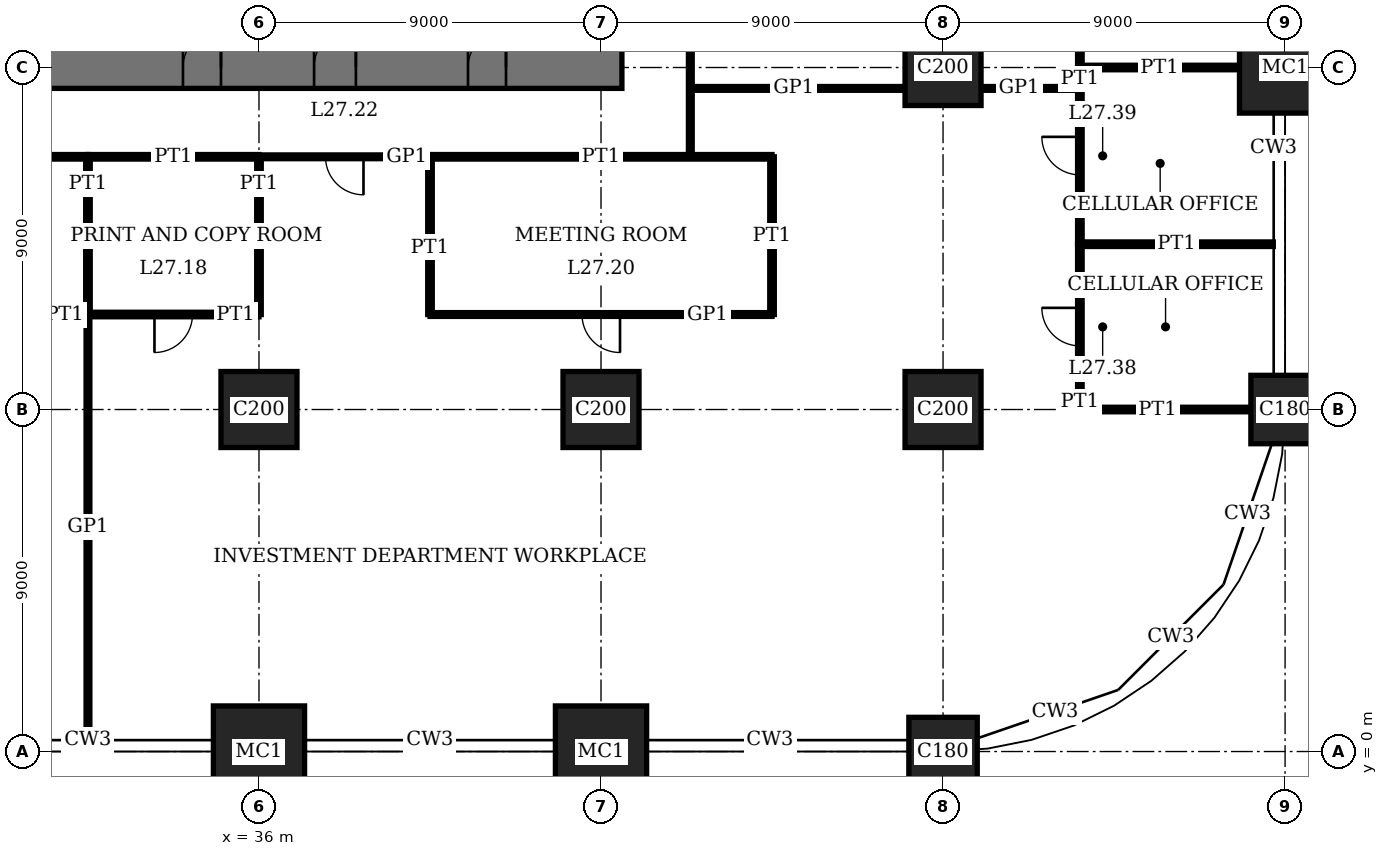
"""IFC4 building model, lengths in metres.
Left out: names, types, materials, properties, quantities, classifications, styles, units other than length and angle.
Written with IfcOpenShell. Run it as: python <this file> out.ifc"""

import sys

from ifc_helpers import new_model, si_unit, direction, frame, frame_2d, origin, origin_2d, place, context, subcontext, project, spatial, rectangle, extrude, element, fill, save


model = new_model("IFC4")
c1 = context("Model", 3, precision=1e-05, world=origin(), true_north=direction((0.0, 1.0)))
c2 = subcontext(c1, "Body", "Model", "MODEL_VIEW")
j1 = project(units=[si_unit("LENGTHUNIT", "METRE"), si_unit("PLANEANGLEUNIT", "RADIAN")], contexts=[c1])
p1 = place(None, origin())
s1 = spatial("IfcSite", under=j1, at=p1, CompositionType="ELEMENT")
p2 = place(p1, origin())
s2 = spatial("IfcBuilding", under=s1, at=p2, CompositionType="ELEMENT")
p3 = place(p2, frame((0.0, 0.0, 113.0)))
s3 = spatial("IfcBuildingStorey", under=s2, at=p3, CompositionType="ELEMENT", Elevation=113.0)
p4 = place(p3, frame((36.0, 0.0, 0.0), z_axis=(0.0, 0.0, 1.0), x_axis=(1.0, 0.0, 0.0)))
e1 = element("IfcColumn", 1, at=p4, inside=s3, PredefinedType="COLUMN", context=c2, shape_type="SweptSolid", body=[
    extrude(rectangle(XDim=2.4, YDim=2.4, at=origin_2d()), origin(), (0.0, 0.0, 1.0), 4.0),
])
p5 = place(p3, frame((36.0, 9.0, 0.0), z_axis=(0.0, 0.0, 1.0), x_axis=(1.0, 0.0, 0.0)))
e2 = element("IfcColumn", 2, at=p5, inside=s3, PredefinedType="COLUMN", context=c2, shape_type="SweptSolid", body=[
    extrude(rectangle(XDim=2.0, YDim=2.0, at=origin_2d()), origin(), (0.0, 0.0, 1.0), 4.0),
])
p6 = place(p3, frame((45.0, 0.0, 0.0), z_axis=(0.0, 0.0, 1.0), x_axis=(1.0, 0.0, 0.0)))
e3 = element("IfcColumn", 3, at=p6, inside=s3, PredefinedType="COLUMN", context=c2, shape_type="SweptSolid", body=[
    extrude(rectangle(XDim=2.4, YDim=2.4, at=origin_2d()), origin(), (0.0, 0.0, 1.0), 4.0),
])
p7 = place(p3, frame((45.0, 9.0, 0.0), z_axis=(0.0, 0.0, 1.0), x_axis=(1.0, 0.0, 0.0)))
e4 = element("IfcColumn", 4, at=p7, inside=s3, PredefinedType="COLUMN", context=c2, shape_type="SweptSolid", body=[
    extrude(rectangle(XDim=2.0, YDim=2.0, at=origin_2d()), origin(), (0.0, 0.0, 1.0), 4.0),
])
p8 = place(p3, frame((54.0, 0.0, 0.0), z_axis=(0.0, 0.0, 1.0), x_axis=(1.0, 0.0, 0.0)))
e5 = element("IfcColumn", 5, at=p8, inside=s3, PredefinedType="COLUMN", context=c2, shape_type="SweptSolid", body=[
    extrude(rectangle(XDim=1.8, YDim=1.8, at=origin_2d()), origin(), (0.0, 0.0, 1.0), 4.0),
])
for number, where, z_axis, x_axis in (
    (6, (54.0, 9.0, 0.0), (0.0, 0.0, 1.0), (1.0, 0.0, 0.0)),
    (7, (54.0, 18.0, 0.0), (0.0, 0.0, 1.0), (1.0, 0.0, 0.0)),
):
    element("IfcColumn", number, at=place(p3, frame(where, z_axis=z_axis, x_axis=x_axis)), inside=s3, PredefinedType="COLUMN", context=c2, shape_type="SweptSolid", body=[
        extrude(rectangle(XDim=2.0, YDim=2.0, at=origin_2d()), origin(), (0.0, 0.0, 1.0), 4.0),
    ])
p9 = place(p3, frame((63.0, 9.0, 0.0), z_axis=(0.0, 0.0, 1.0), x_axis=(1.0, 0.0, 0.0)))
e8 = element("IfcColumn", 8, at=p9, inside=s3, PredefinedType="COLUMN", context=c2, shape_type="SweptSolid", body=[
    extrude(rectangle(XDim=1.8, YDim=1.8, at=origin_2d()), origin(), (0.0, 0.0, 1.0), 4.0),
])
p10 = place(p3, frame((63.0, 18.0, 0.0), z_axis=(0.0, 0.0, 1.0), x_axis=(1.0, 0.0, 0.0)))
e9 = element("IfcColumn", 9, at=p10, inside=s3, PredefinedType="COLUMN", context=c2, shape_type="SweptSolid", body=[
    extrude(rectangle(XDim=2.4, YDim=2.4, at=origin_2d()), origin(), (0.0, 0.0, 1.0), 4.0),
])
p11 = place(p3, frame((17.45, 18.0, 0.0), z_axis=(0.0, 0.0, 1.0), x_axis=(1.0, 0.0, 0.0)))
e10 = element("IfcWall", 10, at=p11, inside=s3, PredefinedType="SHEAR", context=c2, shape_type="SweptSolid", body=[
    extrude(rectangle(XDim=28.1, YDim=1.1, at=frame_2d((14.05, 0.0))), origin(), (0.0, 0.0, 1.0), 4.0),
])
p12 = place(p11, frame((11.55, 0.0, 0.0)))
e11 = element("IfcOpeningElement", 11, at=p12, cuts=e10, PredefinedType="OPENING", context=c2, shape_type="SweptSolid", body=[
    extrude(rectangle(XDim=1.0, YDim=2.4, at=frame_2d((0.5, 1.2))), frame((0.0, 0.56, 0.0), z_axis=(0.0, -1.0, 0.0), x_axis=(1.0, 0.0, 0.0)), (0.0, 0.0, 1.0), 1.12),
])
p13 = place(p11, frame((16.55, 0.0, 0.0)))
e12 = element("IfcOpeningElement", 12, at=p13, cuts=e10, PredefinedType="OPENING", context=c2, shape_type="SweptSolid", body=[
    extrude(rectangle(XDim=1.0, YDim=2.4, at=frame_2d((0.5, 1.2))), frame((0.0, 0.56, 0.0), z_axis=(0.0, -1.0, 0.0), x_axis=(1.0, 0.0, 0.0)), (0.0, 0.0, 1.0), 1.12),
])
p14 = place(p11, frame((20.0, 0.0, 0.0)))
e13 = element("IfcOpeningElement", 13, at=p14, cuts=e10, PredefinedType="OPENING", context=c2, shape_type="SweptSolid", body=[
    extrude(rectangle(XDim=1.1, YDim=2.4, at=frame_2d((0.55, 1.2))), frame((0.0, 0.56, 0.0), z_axis=(0.0, -1.0, 0.0), x_axis=(1.0, 0.0, 0.0)), (0.0, 0.0, 1.0), 1.12),
])
p15 = place(p11, frame((24.05, 0.0, 0.0)))
e14 = element("IfcOpeningElement", 14, at=p15, cuts=e10, PredefinedType="OPENING", context=c2, shape_type="SweptSolid", body=[
    extrude(rectangle(XDim=1.0, YDim=2.4, at=frame_2d((0.5, 1.2))), frame((0.0, 0.56, 0.0), z_axis=(0.0, -1.0, 0.0), x_axis=(1.0, 0.0, 0.0)), (0.0, 0.0, 1.0), 1.12),
])
p16 = place(p3, frame((57.6, 9.0, 0.0), z_axis=(0.0, 0.0, 1.0), x_axis=(1.0, 0.0, 0.0)))
e15 = element("IfcWall", 15, at=p16, inside=s3, PredefinedType="PARTITIONING", context=c2, shape_type="SweptSolid", body=[
    extrude(rectangle(XDim=4.5, YDim=0.12, at=frame_2d((2.25, 0.0))), origin(), (0.0, 0.0, 1.0), 3.05),
])
p17 = place(p3, frame((27.0, 11.5, 0.0), z_axis=(0.0, 0.0, 1.0), x_axis=(1.0, 0.0, 0.0)))
e16 = element("IfcWall", 16, at=p17, inside=s3, PredefinedType="PARTITIONING", context=c2, shape_type="SweptSolid", body=[
    extrude(rectangle(XDim=4.5, YDim=0.12, at=frame_2d((2.25, 0.0))), origin(), (0.0, 0.0, 1.0), 3.75),
])
p18 = place(p17, frame((1.75, 0.0, 0.0)))
e17 = element("IfcOpeningElement", 17, at=p18, cuts=e16, PredefinedType="OPENING", context=c2, shape_type="SweptSolid", body=[
    extrude(rectangle(XDim=1.0, YDim=2.4, at=frame_2d((0.5, 1.2))), frame((0.0, 0.07, 0.0), z_axis=(0.0, -1.0, 0.0), x_axis=(1.0, 0.0, 0.0)), (0.0, 0.0, 1.0), 0.14),
])
p19 = place(p3, frame((31.5, 11.5, 0.0), z_axis=(0.0, 0.0, 1.0), x_axis=(1.0, 0.0, 0.0)))
e18 = element("IfcWall", 18, at=p19, inside=s3, PredefinedType="PARTITIONING", context=c2, shape_type="SweptSolid", body=[
    extrude(rectangle(XDim=4.5, YDim=0.12, at=frame_2d((2.25, 0.0))), origin(), (0.0, 0.0, 1.0), 3.75),
])
p20 = place(p19, frame((1.75, 0.0, 0.0)))
e19 = element("IfcOpeningElement", 19, at=p20, cuts=e18, PredefinedType="OPENING", context=c2, shape_type="SweptSolid", body=[
    extrude(rectangle(XDim=1.0, YDim=2.4, at=frame_2d((0.5, 1.2))), frame((0.0, 0.07, 0.0), z_axis=(0.0, -1.0, 0.0), x_axis=(1.0, 0.0, 0.0)), (0.0, 0.0, 1.0), 0.14),
])
p21 = place(p3, frame((40.5, 11.5, 0.0), z_axis=(0.0, 0.0, 1.0), x_axis=(1.0, 0.0, 0.0)))
e20 = element("IfcWall", 20, at=p21, inside=s3, PredefinedType="PARTITIONING", context=c2, shape_type="SweptSolid", body=[
    extrude(rectangle(XDim=9.0, YDim=0.1, at=frame_2d((4.5, 0.0))), origin(), (0.0, 0.0, 1.0), 3.75),
])
p22 = place(p21, frame((4.0, 0.0, 0.0)))
e21 = element("IfcOpeningElement", 21, at=p22, cuts=e20, PredefinedType="OPENING", context=c2, shape_type="SweptSolid", body=[
    extrude(rectangle(XDim=1.0, YDim=2.4, at=frame_2d((0.5, 1.2))), frame((0.0, 0.06, 0.0), z_axis=(0.0, -1.0, 0.0), x_axis=(1.0, 0.0, 0.0)), (0.0, 0.0, 1.0), 0.12),
])
p23 = place(p3, frame((57.6, 13.35, 0.0), z_axis=(0.0, 0.0, 1.0), x_axis=(1.0, 0.0, 0.0)))
e22 = element("IfcWall", 22, at=p23, inside=s3, PredefinedType="PARTITIONING", context=c2, shape_type="SweptSolid", body=[
    extrude(rectangle(XDim=5.09, YDim=0.12, at=frame_2d((2.545, 0.0))), origin(), (0.0, 0.0, 1.0), 3.1),
])
p24 = place(p3, frame((40.5, 15.65, 0.0), z_axis=(0.0, 0.0, 1.0), x_axis=(1.0, 0.0, 0.0)))
e23 = element("IfcWall", 23, at=p24, inside=s3, PredefinedType="PARTITIONING", context=c2, shape_type="SweptSolid", body=[
    extrude(rectangle(XDim=9.0, YDim=0.12, at=frame_2d((4.5, 0.0))), origin(), (0.0, 0.0, 1.0), 3.75),
])
for number, where, z_axis, x_axis in (
    (24, (27.0, 15.65, 0.0), (0.0, 0.0, 1.0), (1.0, 0.0, 0.0)),
    (25, (31.5, 15.65, 0.0), (0.0, 0.0, 1.0), (1.0, 0.0, 0.0)),
):
    element("IfcWall", number, at=place(p3, frame(where, z_axis=z_axis, x_axis=x_axis)), inside=s3, PredefinedType="PARTITIONING", context=c2, shape_type="SweptSolid", body=[
        extrude(rectangle(XDim=4.5, YDim=0.12, at=frame_2d((2.25, 0.0))), origin(), (0.0, 0.0, 1.0), 3.75),
    ])
p25 = place(p3, frame((36.0, 15.65, 0.0), z_axis=(0.0, 0.0, 1.0), x_axis=(1.0, 0.0, 0.0)))
e26 = element("IfcWall", 26, at=p25, inside=s3, PredefinedType="PARTITIONING", context=c2, shape_type="SweptSolid", body=[
    extrude(rectangle(XDim=4.5, YDim=0.1, at=frame_2d((2.25, 0.0))), origin(), (0.0, 0.0, 1.0), 3.75),
])
p26 = place(p25, frame((1.75, 0.0, 0.0)))
e27 = element("IfcOpeningElement", 27, at=p26, cuts=e26, PredefinedType="OPENING", context=c2, shape_type="SweptSolid", body=[
    extrude(rectangle(XDim=1.0, YDim=2.4, at=frame_2d((0.5, 1.2))), frame((0.0, 0.06, 0.0), z_axis=(0.0, -1.0, 0.0), x_axis=(1.0, 0.0, 0.0)), (0.0, 0.0, 1.0), 0.12),
])
p27 = place(p3, frame((47.35, 17.45, 0.0), z_axis=(0.0, 0.0, 1.0), x_axis=(1.0, 0.0, 0.0)))
e28 = element("IfcWall", 28, at=p27, inside=s3, PredefinedType="PARTITIONING", context=c2, shape_type="SweptSolid", body=[
    extrude(rectangle(XDim=5.65, YDim=0.1, at=frame_2d((2.825, 0.0))), origin(), (0.0, 0.0, 1.0), 3.75),
])
p28 = place(p3, frame((55.0, 17.45, 0.0), z_axis=(0.0, 0.0, 1.0), x_axis=(1.0, 0.0, 0.0)))
e29 = element("IfcWall", 29, at=p28, inside=s3, PredefinedType="PARTITIONING", context=c2, shape_type="SweptSolid", body=[
    extrude(rectangle(XDim=2.61, YDim=0.1, at=frame_2d((1.305, 0.0))), origin(), (0.0, 0.0, 1.0), 3.75),
])
p29 = place(p3, frame((57.6, 18.0, 0.0), z_axis=(0.0, 0.0, 1.0), x_axis=(1.0, 0.0, 0.0)))
e30 = element("IfcWall", 30, at=p29, inside=s3, PredefinedType="PARTITIONING", context=c2, shape_type="SweptSolid", body=[
    extrude(rectangle(XDim=4.2, YDim=0.12, at=frame_2d((2.1, 0.0))), origin(), (0.0, 0.0, 1.0), 3.05),
])
p30 = place(p3, frame((31.5, 11.5, 0.0), z_axis=(0.0, 0.0, 1.0), x_axis=(0.0, 1.0, 0.0)))
e31 = element("IfcWall", 31, at=p30, inside=s3, PredefinedType="PARTITIONING", context=c2, shape_type="SweptSolid", body=[
    extrude(rectangle(XDim=4.15, YDim=0.12, at=frame_2d((2.075, 0.0))), origin(), (0.0, 0.0, 1.0), 3.75),
])
p31 = place(p3, frame((31.5, 0.31, 0.0), z_axis=(0.0, 0.0, 1.0), x_axis=(0.0, 1.0, 0.0)))
e32 = element("IfcWall", 32, at=p31, inside=s3, PredefinedType="PARTITIONING", context=c2, shape_type="SweptSolid", body=[
    extrude(rectangle(XDim=11.19, YDim=0.1, at=frame_2d((5.595, 0.0))), origin(), (0.0, 0.0, 1.0), 3.75),
])
p32 = place(p3, frame((36.0, 11.5, 0.0), z_axis=(0.0, 0.0, 1.0), x_axis=(0.0, 1.0, 0.0)))
e33 = element("IfcWall", 33, at=p32, inside=s3, PredefinedType="PARTITIONING", context=c2, shape_type="SweptSolid", body=[
    extrude(rectangle(XDim=4.15, YDim=0.12, at=frame_2d((2.075, 0.0))), origin(), (0.0, 0.0, 1.0), 3.05),
])
p33 = place(p3, frame((40.5, 11.5, 0.0), z_axis=(0.0, 0.0, 1.0), x_axis=(0.0, 1.0, 0.0)))
e34 = element("IfcWall", 34, at=p33, inside=s3, PredefinedType="PARTITIONING", context=c2, shape_type="SweptSolid", body=[
    extrude(rectangle(XDim=4.15, YDim=0.12, at=frame_2d((2.075, 0.0))), origin(), (0.0, 0.0, 1.0), 3.75),
])
p34 = place(p3, frame((47.35, 15.65, 0.0), z_axis=(0.0, 0.0, 1.0), x_axis=(0.0, 1.0, 0.0)))
e35 = element("IfcWall", 35, at=p34, inside=s3, PredefinedType="PARTITIONING", context=c2, shape_type="SweptSolid", body=[
    extrude(rectangle(XDim=20.9, YDim=0.1, at=frame_2d((10.45, 0.0))), origin(), (0.0, 0.0, 1.0), 3.75),
])
p35 = place(p34, frame((9.95, 0.0, 0.0)))
e36 = element("IfcOpeningElement", 36, at=p35, cuts=e35, PredefinedType="OPENING", context=c2, shape_type="SweptSolid", body=[
    extrude(rectangle(XDim=1.0, YDim=2.4, at=frame_2d((0.5, 1.2))), frame((0.0, 0.06, 0.0), z_axis=(0.0, -1.0, 0.0), x_axis=(1.0, 0.0, 0.0)), (0.0, 0.0, 1.0), 0.12),
])
p36 = place(p3, frame((49.5, 11.5, 0.0), z_axis=(0.0, 0.0, 1.0), x_axis=(0.0, 1.0, 0.0)))
e37 = element("IfcWall", 37, at=p36, inside=s3, PredefinedType="PARTITIONING", context=c2, shape_type="SweptSolid", body=[
    extrude(rectangle(XDim=4.15, YDim=0.12, at=frame_2d((2.075, 0.0))), origin(), (0.0, 0.0, 1.0), 3.75),
])
p37 = place(p3, frame((57.6, 9.0, 0.0), z_axis=(0.0, 0.0, 1.0), x_axis=(0.0, 1.0, 0.0)))
e38 = element("IfcWall", 38, at=p37, inside=s3, PredefinedType="PARTITIONING", context=c2, shape_type="SweptSolid", body=[
    extrude(rectangle(XDim=4.35, YDim=0.12, at=frame_2d((2.175, 0.0))), origin(), (0.0, 0.0, 1.0), 3.75),
])
p38 = place(p37, frame((1.675, 0.0, 0.0)))
e39 = element("IfcOpeningElement", 39, at=p38, cuts=e38, PredefinedType="OPENING", context=c2, shape_type="SweptSolid", body=[
    extrude(rectangle(XDim=1.0, YDim=2.4, at=frame_2d((0.5, 1.2))), frame((0.0, 0.07, 0.0), z_axis=(0.0, -1.0, 0.0), x_axis=(1.0, 0.0, 0.0)), (0.0, 0.0, 1.0), 0.14),
])
p39 = place(p3, frame((57.6, 13.35, 0.0), z_axis=(0.0, 0.0, 1.0), x_axis=(0.0, 1.0, 0.0)))
e40 = element("IfcWall", 40, at=p39, inside=s3, PredefinedType="PARTITIONING", context=c2, shape_type="SweptSolid", body=[
    extrude(rectangle(XDim=4.65, YDim=0.12, at=frame_2d((2.325, 0.0))), origin(), (0.0, 0.0, 1.0), 3.75),
])
p40 = place(p39, frame((1.825, 0.0, 0.0)))
e41 = element("IfcOpeningElement", 41, at=p40, cuts=e40, PredefinedType="OPENING", context=c2, shape_type="SweptSolid", body=[
    extrude(rectangle(XDim=1.0, YDim=2.4, at=frame_2d((0.5, 1.2))), frame((0.0, 0.07, 0.0), z_axis=(0.0, -1.0, 0.0), x_axis=(1.0, 0.0, 0.0)), (0.0, 0.0, 1.0), 0.14),
])
p41 = place(p3, frame((57.6, 18.0, 0.0), z_axis=(0.0, 0.0, 1.0), x_axis=(0.0, 1.0, 0.0)))
e42 = element("IfcWall", 42, at=p41, inside=s3, PredefinedType="PARTITIONING", context=c2, shape_type="SweptSolid", body=[
    extrude(rectangle(XDim=4.5, YDim=0.12, at=frame_2d((2.25, 0.0))), origin(), (0.0, 0.0, 1.0), 3.75),
])
p42 = place(p41, frame((1.75, 0.0, 0.0)))
e43 = element("IfcOpeningElement", 43, at=p42, cuts=e42, PredefinedType="OPENING", context=c2, shape_type="SweptSolid", body=[
    extrude(rectangle(XDim=1.0, YDim=2.4, at=frame_2d((0.5, 1.2))), frame((0.0, 0.07, 0.0), z_axis=(0.0, -1.0, 0.0), x_axis=(1.0, 0.0, 0.0)), (0.0, 0.0, 1.0), 0.14),
])
p43 = place(p13, origin())
e44 = element("IfcDoor", 44, at=p43, inside=s3, OperationType="SINGLE_SWING_LEFT", PredefinedType="DOOR", context=c2, shape_type="SweptSolid", body=[
    extrude(rectangle(XDim=1.0, YDim=2.4, at=frame_2d((0.5, 1.2))), frame((0.0, 0.025, 0.0), z_axis=(0.0, -1.0, 0.0), x_axis=(1.0, 0.0, 0.0)), (0.0, 0.0, 1.0), 0.05),
    extrude(rectangle(XDim=0.04, YDim=2.4, at=frame_2d((0.02, 1.2))), frame((0.0, 0.4, 0.0), z_axis=(0.0, -1.0, 0.0), x_axis=(1.0, 0.0, 0.0)), (0.0, 0.0, 1.0), 0.8),
    extrude(rectangle(XDim=0.04, YDim=2.4, at=frame_2d((0.98, 1.2))), frame((0.0, 0.4, 0.0), z_axis=(0.0, -1.0, 0.0), x_axis=(1.0, 0.0, 0.0)), (0.0, 0.0, 1.0), 0.8),
    extrude(rectangle(XDim=1.0, YDim=0.04, at=frame_2d((0.5, 2.38))), frame((0.0, 0.4, 0.0), z_axis=(0.0, -1.0, 0.0), x_axis=(1.0, 0.0, 0.0)), (0.0, 0.0, 1.0), 0.8),
])
fill(e12, e44)
p44 = place(p14, origin())
e45 = element("IfcDoor", 45, at=p44, inside=s3, OperationType="SINGLE_SWING_LEFT", PredefinedType="DOOR", context=c2, shape_type="SweptSolid", body=[
    extrude(rectangle(XDim=1.1, YDim=2.4, at=frame_2d((0.55, 1.2))), frame((0.0, 0.025, 0.0), z_axis=(0.0, -1.0, 0.0), x_axis=(1.0, 0.0, 0.0)), (0.0, 0.0, 1.0), 0.05),
    extrude(rectangle(XDim=0.04, YDim=2.4, at=frame_2d((0.02, 1.2))), frame((0.0, 0.44, 0.0), z_axis=(0.0, -1.0, 0.0), x_axis=(1.0, 0.0, 0.0)), (0.0, 0.0, 1.0), 0.88),
    extrude(rectangle(XDim=0.04, YDim=2.4, at=frame_2d((1.08, 1.2))), frame((0.0, 0.44, 0.0), z_axis=(0.0, -1.0, 0.0), x_axis=(1.0, 0.0, 0.0)), (0.0, 0.0, 1.0), 0.88),
    extrude(rectangle(XDim=1.1, YDim=0.04, at=frame_2d((0.55, 2.38))), frame((0.0, 0.44, 0.0), z_axis=(0.0, -1.0, 0.0), x_axis=(1.0, 0.0, 0.0)), (0.0, 0.0, 1.0), 0.88),
])
fill(e13, e45)
p45 = place(p15, origin())
e46 = element("IfcDoor", 46, at=p45, inside=s3, OperationType="SINGLE_SWING_LEFT", PredefinedType="DOOR", context=c2, shape_type="SweptSolid", body=[
    extrude(rectangle(XDim=1.0, YDim=2.4, at=frame_2d((0.5, 1.2))), frame((0.0, 0.025, 0.0), z_axis=(0.0, -1.0, 0.0), x_axis=(1.0, 0.0, 0.0)), (0.0, 0.0, 1.0), 0.05),
    extrude(rectangle(XDim=0.04, YDim=2.4, at=frame_2d((0.02, 1.2))), frame((0.0, 0.4, 0.0), z_axis=(0.0, -1.0, 0.0), x_axis=(1.0, 0.0, 0.0)), (0.0, 0.0, 1.0), 0.8),
    extrude(rectangle(XDim=0.04, YDim=2.4, at=frame_2d((0.98, 1.2))), frame((0.0, 0.4, 0.0), z_axis=(0.0, -1.0, 0.0), x_axis=(1.0, 0.0, 0.0)), (0.0, 0.0, 1.0), 0.8),
    extrude(rectangle(XDim=1.0, YDim=0.04, at=frame_2d((0.5, 2.38))), frame((0.0, 0.4, 0.0), z_axis=(0.0, -1.0, 0.0), x_axis=(1.0, 0.0, 0.0)), (0.0, 0.0, 1.0), 0.8),
])
fill(e14, e46)
p46 = place(p20, origin())
e47 = element("IfcDoor", 47, at=p46, inside=s3, OperationType="SINGLE_SWING_LEFT", PredefinedType="DOOR", context=c2, shape_type="SweptSolid", body=[
    extrude(rectangle(XDim=1.0, YDim=2.4, at=frame_2d((0.5, 1.2))), frame((0.0, 0.025, 0.0), z_axis=(0.0, -1.0, 0.0), x_axis=(1.0, 0.0, 0.0)), (0.0, 0.0, 1.0), 0.05),
])
fill(e19, e47)
p47 = place(p22, origin())
e48 = element("IfcDoor", 48, at=p47, inside=s3, OperationType="SINGLE_SWING_RIGHT", PredefinedType="DOOR", context=c2, shape_type="SweptSolid", body=[
    extrude(rectangle(XDim=1.0, YDim=2.4, at=frame_2d((0.5, 1.2))), frame((0.0, 0.02, 0.0), z_axis=(0.0, -1.0, 0.0), x_axis=(1.0, 0.0, 0.0)), (0.0, 0.0, 1.0), 0.04),
])
fill(e21, e48)
p48 = place(p26, origin())
e49 = element("IfcDoor", 49, at=p48, inside=s3, OperationType="SINGLE_SWING_RIGHT", PredefinedType="DOOR", context=c2, shape_type="SweptSolid", body=[
    extrude(rectangle(XDim=1.0, YDim=2.4, at=frame_2d((0.5, 1.2))), frame((0.0, 0.02, 0.0), z_axis=(0.0, -1.0, 0.0), x_axis=(1.0, 0.0, 0.0)), (0.0, 0.0, 1.0), 0.04),
])
fill(e27, e49)
p49 = place(p38, origin())
e50 = element("IfcDoor", 50, at=p49, inside=s3, OperationType="SINGLE_SWING_LEFT", PredefinedType="DOOR", context=c2, shape_type="SweptSolid", body=[
    extrude(rectangle(XDim=1.0, YDim=2.4, at=frame_2d((0.5, 1.2))), frame((0.0, 0.025, 0.0), z_axis=(0.0, -1.0, 0.0), x_axis=(1.0, 0.0, 0.0)), (0.0, 0.0, 1.0), 0.05),
])
fill(e39, e50)
p50 = place(p40, origin())
e51 = element("IfcDoor", 51, at=p50, inside=s3, OperationType="SINGLE_SWING_LEFT", PredefinedType="DOOR", context=c2, shape_type="SweptSolid", body=[
    extrude(rectangle(XDim=1.0, YDim=2.4, at=frame_2d((0.5, 1.2))), frame((0.0, 0.025, 0.0), z_axis=(0.0, -1.0, 0.0), x_axis=(1.0, 0.0, 0.0)), (0.0, 0.0, 1.0), 0.05),
])
fill(e41, e51)
save(model, sys.argv[1])
